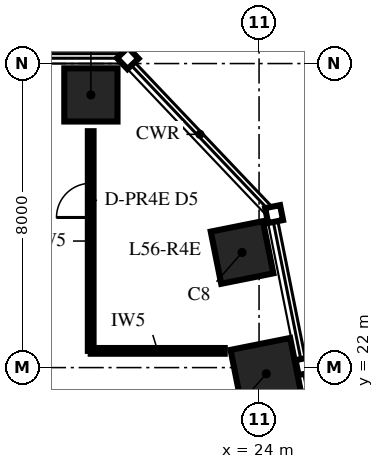
"""IFC4 building model, lengths in metres.
Left out: names, types, materials, properties, quantities, classifications, styles, units other than length and angle.
Written with IfcOpenShell. Run it as: python <this file> out.ifc"""

import sys

from ifc_helpers import new_model, si_unit, direction, frame, frame_2d, origin, origin_2d, place, context, subcontext, project, spatial, rectangle, extrude, element, fill, save


model = new_model("IFC4")
c1 = context("Model", 3, precision=1e-05, world=origin(), true_north=direction((0.0, 1.0)))
c2 = subcontext(c1, "Body", "Model", "MODEL_VIEW")
j1 = project(units=[si_unit("LENGTHUNIT", "METRE"), si_unit("PLANEANGLEUNIT", "RADIAN")], contexts=[c1])
p1 = place(None, origin())
s1 = spatial("IfcSite", under=j1, at=p1, CompositionType="ELEMENT")
p2 = place(p1, origin())
s2 = spatial("IfcBuilding", under=s1, at=p2, CompositionType="ELEMENT")
p3 = place(p2, frame((0.0, 0.0, 242.0)))
s3 = spatial("IfcBuildingStorey", under=s2, at=p3, CompositionType="ELEMENT", Elevation=242.0)
p4 = place(p3, frame((24.191, 21.838, 0.0), z_axis=(0.0, 0.0, 1.0), x_axis=(-0.196116135138, 0.980580675691, 0.0)))
e1 = element("IfcColumn", 1, at=p4, inside=s3, PredefinedType="COLUMN", context=c2, shape_type="SweptSolid", body=[
    extrude(rectangle(XDim=1.6, YDim=1.6, at=origin_2d()), origin(), (0.0, 0.0, 1.0), 6.0),
])
for number, where, z_axis, x_axis in (
    (2, (23.553, 25.029, 0.0), (0.0, 0.0, 1.0), (-0.196, 0.981, 0.0)),
    (3, (19.575, 29.175, 0.0), (0.0, 0.0, 1.0), (-1.0, 0.0, 0.0)),
):
    element("IfcColumn", number, at=place(p3, frame(where, z_axis=z_axis, x_axis=x_axis)), inside=s3, PredefinedType="COLUMN", context=c2, shape_type="SweptSolid", body=[
        extrude(rectangle(XDim=1.4, YDim=1.4, at=origin_2d()), origin(), (0.0, 0.0, 1.0), 6.0),
    ])
p5 = place(p3, frame((19.57, 22.44, 0.0), z_axis=(0.0, 0.0, 1.0), x_axis=(1.0, 0.0, 0.0)))
e4 = element("IfcWall", 4, at=p5, inside=s3, PredefinedType="PARTITIONING", context=c2, shape_type="SweptSolid", body=[
    extrude(rectangle(XDim=3.527, YDim=0.15, at=frame_2d((1.763, 0.0))), origin(), (0.0, 0.0, 1.0), 5.85),
])
p6 = place(p3, frame((19.57, 22.44, 0.0), z_axis=(0.0, 0.0, 1.0), x_axis=(0.0, 1.0, 0.0)))
e5 = element("IfcWall", 5, at=p6, inside=s3, PredefinedType="PARTITIONING", context=c2, shape_type="SweptSolid", body=[
    extrude(rectangle(XDim=5.78, YDim=0.15, at=frame_2d((2.89, 0.0))), origin(), (0.0, 0.0, 1.0), 5.4),
])
p7 = place(p6, frame((3.51, 0.0, 0.0)))
e6 = element("IfcOpeningElement", 6, at=p7, cuts=e5, PredefinedType="OPENING", context=c2, shape_type="SweptSolid", body=[
    extrude(rectangle(XDim=0.9, YDim=2.1, at=frame_2d((0.45, 1.05))), frame((0.0, 0.09, 0.0), z_axis=(0.0, -1.0, 0.0), x_axis=(1.0, 0.0, 0.0)), (0.0, 0.0, 1.0), 0.18),
])
p8 = place(p7, origin())
e7 = element("IfcDoor", 7, at=p8, inside=s3, OperationType="SINGLE_SWING_LEFT", PredefinedType="DOOR", context=c2, shape_type="SweptSolid", body=[
    extrude(rectangle(XDim=0.9, YDim=2.1, at=frame_2d((0.45, 1.05))), frame((0.0, 0.075, 0.0), z_axis=(0.0, -1.0, 0.0), x_axis=(1.0, 0.0, 0.0)), (0.0, 0.0, 1.0), 0.149),
])
fill(e6, e7)
save(model, sys.argv[1])
